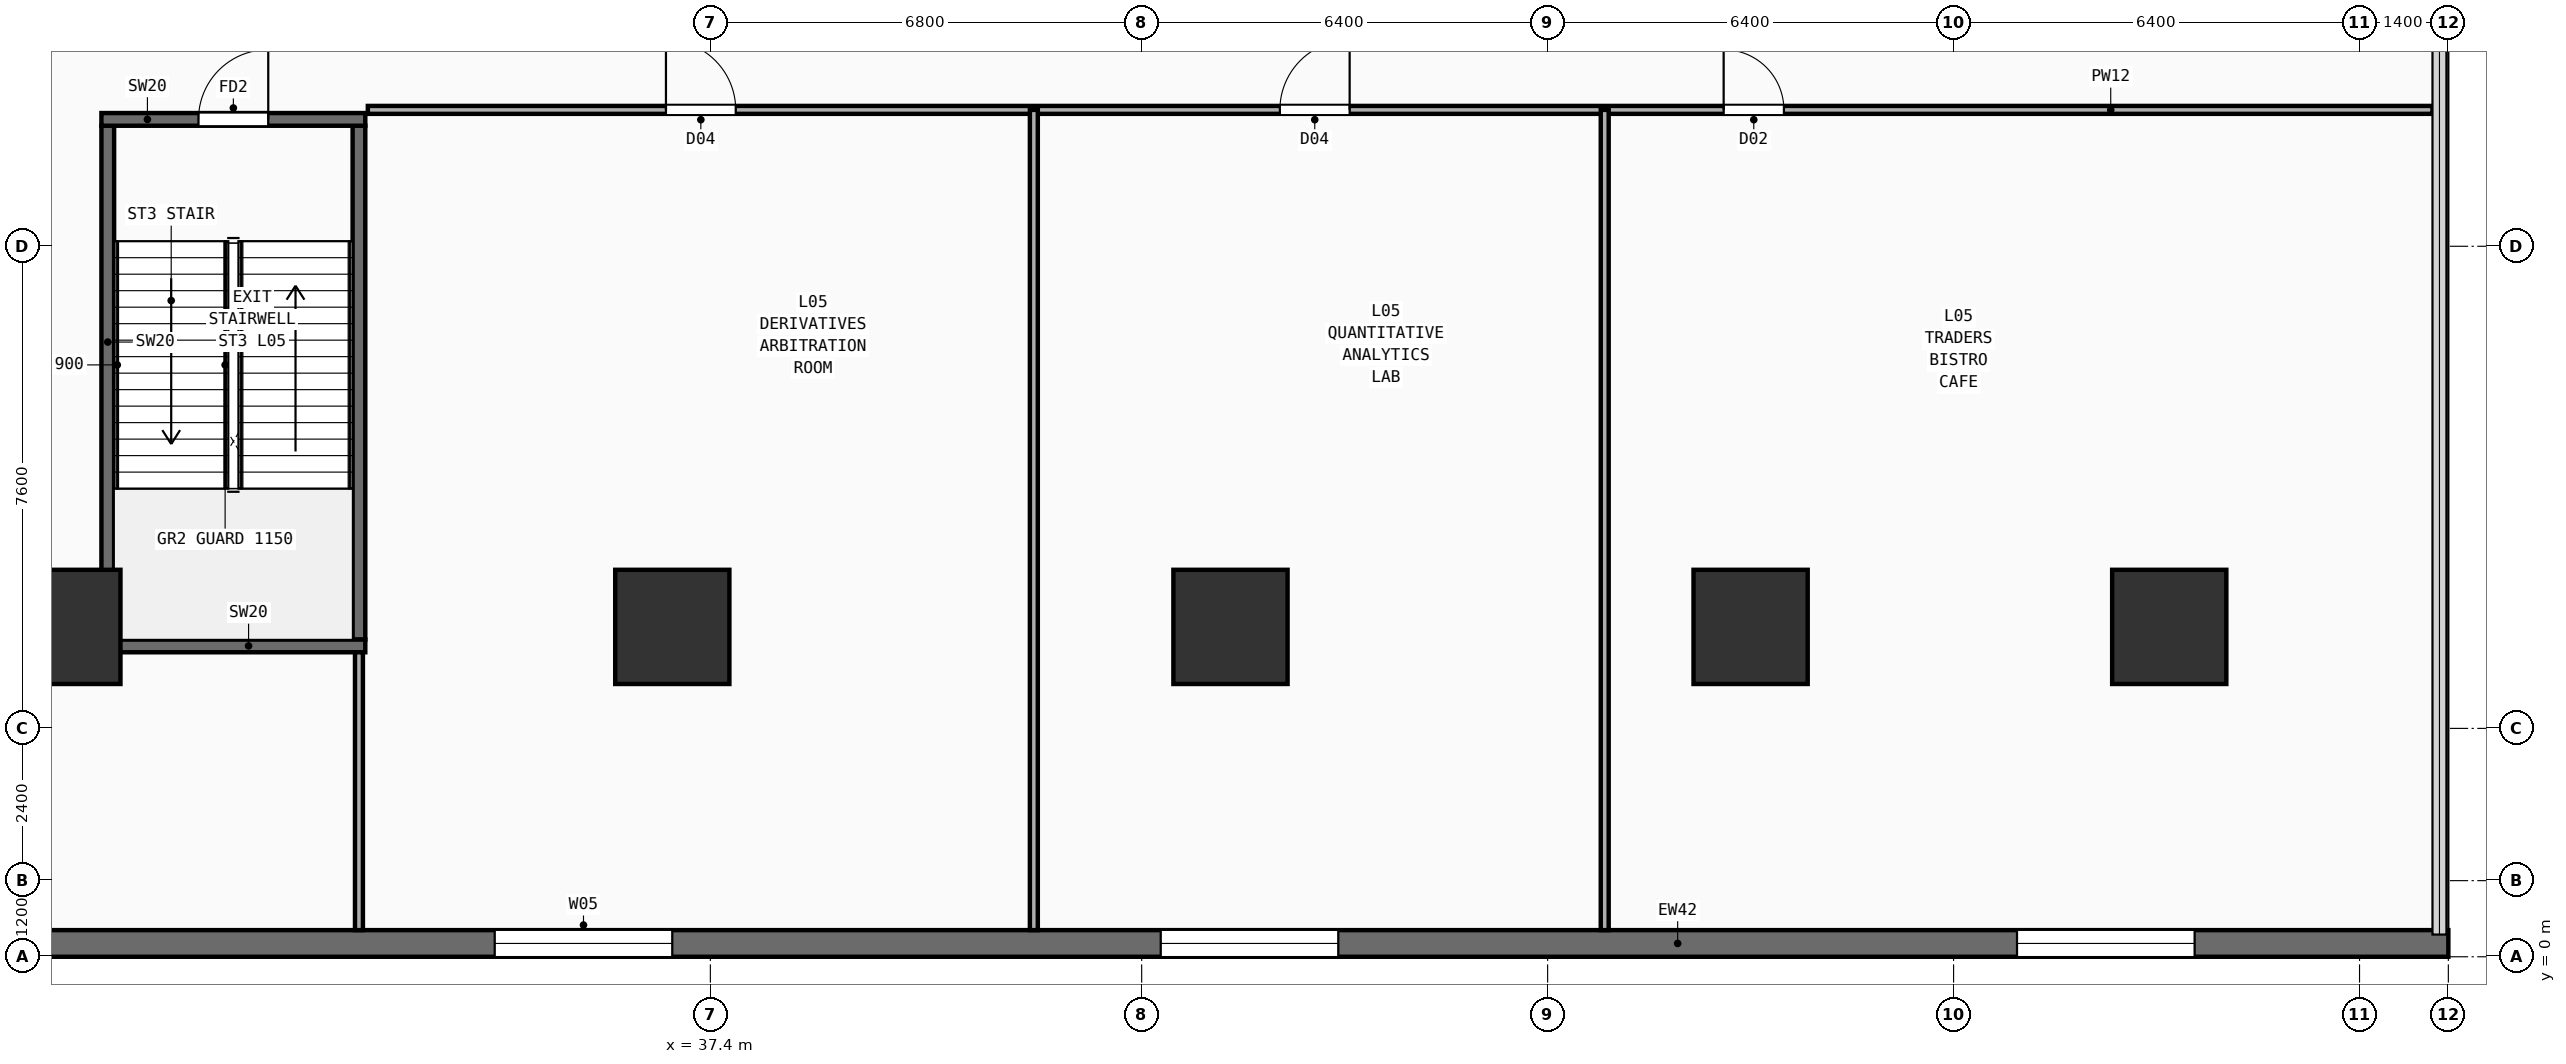
"""IFC4 building model, lengths in metres.
Left out: names, types, materials, properties, quantities, classifications, styles, units other than length and angle.
Written with IfcOpenShell. Run it as: python <this file> out.ifc"""

import sys

from ifc_helpers import new_model, si_unit, direction, frame, frame_2d, origin, origin_2d, place, context, subcontext, project, spatial, rectangle, extrude, element, fill, save


model = new_model("IFC4")
c1 = context("Model", 3, precision=1e-05, world=origin(), true_north=direction((0.0, 1.0)))
c2 = subcontext(c1, "Body", "Model", "MODEL_VIEW")
j1 = project(units=[si_unit("LENGTHUNIT", "METRE"), si_unit("PLANEANGLEUNIT", "RADIAN")], contexts=[c1])
p1 = place(None, origin())
s1 = spatial("IfcSite", under=j1, at=p1, CompositionType="ELEMENT")
p2 = place(p1, origin())
s2 = spatial("IfcBuilding", under=s1, at=p2, CompositionType="ELEMENT")
p3 = place(p2, frame((0.0, 0.0, 20.0)))
s3 = spatial("IfcBuildingStorey", under=s2, at=p3, CompositionType="ELEMENT", Elevation=20.0)
for number, where, z_axis, x_axis in (
    (1, (27.2, 5.2, 0.0), (0.0, 0.0, 1.0), (1.0, 0.0, 0.0)),
    (2, (36.8, 5.2, 0.0), (0.0, 0.0, 1.0), (1.0, 0.0, 0.0)),
    (3, (45.6, 5.2, 0.0), (0.0, 0.0, 1.0), (1.0, 0.0, 0.0)),
    (4, (53.8, 5.2, 0.0), (0.0, 0.0, 1.0), (1.0, 0.0, 0.0)),
    (5, (60.4, 5.2, 0.0), (0.0, 0.0, 1.0), (1.0, 0.0, 0.0)),
):
    element("IfcColumn", number, at=place(p3, frame(where, z_axis=z_axis, x_axis=x_axis)), inside=s3, PredefinedType="COLUMN", context=c2, shape_type="SweptSolid", body=[
        extrude(rectangle(XDim=1.8, YDim=1.8, at=origin_2d()), origin(), (0.0, 0.0, 1.0), 4.46),
    ])
p4 = place(p3, frame((0.0, 0.21, 0.0), z_axis=(0.0, 0.0, 1.0), x_axis=(1.0, 0.0, 0.0)))
e6 = element("IfcWall", 6, at=p4, inside=s3, PredefinedType="SOLIDWALL", context=c2, shape_type="SweptSolid", body=[
    extrude(rectangle(XDim=64.8, YDim=0.42, at=frame_2d((32.4, 0.0))), origin(), (0.0, 0.0, 1.0), 4.46),
])
p5 = place(p4, frame((8.0, 0.0, 0.95)))
e7 = element("IfcOpeningElement", 7, at=p5, cuts=e6, PredefinedType="OPENING", context=c2, shape_type="SweptSolid", body=[
    extrude(rectangle(XDim=2.8, YDim=2.4, at=frame_2d((1.4, 1.2))), frame((0.0, 0.22, 0.0), z_axis=(0.0, -1.0, 0.0), x_axis=(1.0, 0.0, 0.0)), (0.0, 0.0, 1.0), 0.44),
])
p6 = place(p4, frame((16.0, 0.0, 0.95)))
e8 = element("IfcOpeningElement", 8, at=p6, cuts=e6, PredefinedType="OPENING", context=c2, shape_type="SweptSolid", body=[
    extrude(rectangle(XDim=2.8, YDim=2.4, at=frame_2d((1.4, 1.2))), frame((0.0, 0.22, 0.0), z_axis=(0.0, -1.0, 0.0), x_axis=(1.0, 0.0, 0.0)), (0.0, 0.0, 1.0), 0.44),
])
p7 = place(p4, frame((24.0, 0.0, 0.95)))
e9 = element("IfcOpeningElement", 9, at=p7, cuts=e6, PredefinedType="OPENING", context=c2, shape_type="SweptSolid", body=[
    extrude(rectangle(XDim=2.8, YDim=2.4, at=frame_2d((1.4, 1.2))), frame((0.0, 0.22, 0.0), z_axis=(0.0, -1.0, 0.0), x_axis=(1.0, 0.0, 0.0)), (0.0, 0.0, 1.0), 0.44),
])
p8 = place(p4, frame((34.0, 0.0, 0.95)))
e10 = element("IfcOpeningElement", 10, at=p8, cuts=e6, PredefinedType="OPENING", context=c2, shape_type="SweptSolid", body=[
    extrude(rectangle(XDim=2.8, YDim=2.4, at=frame_2d((1.4, 1.2))), frame((0.0, 0.22, 0.0), z_axis=(0.0, -1.0, 0.0), x_axis=(1.0, 0.0, 0.0)), (0.0, 0.0, 1.0), 0.44),
])
p9 = place(p4, frame((44.5, 0.0, 0.95)))
e11 = element("IfcOpeningElement", 11, at=p9, cuts=e6, PredefinedType="OPENING", context=c2, shape_type="SweptSolid", body=[
    extrude(rectangle(XDim=2.8, YDim=2.4, at=frame_2d((1.4, 1.2))), frame((0.0, 0.22, 0.0), z_axis=(0.0, -1.0, 0.0), x_axis=(1.0, 0.0, 0.0)), (0.0, 0.0, 1.0), 0.44),
])
p10 = place(p4, frame((58.0, 0.0, 0.95)))
e12 = element("IfcOpeningElement", 12, at=p10, cuts=e6, PredefinedType="OPENING", context=c2, shape_type="SweptSolid", body=[
    extrude(rectangle(XDim=2.8, YDim=2.4, at=frame_2d((1.4, 1.2))), frame((0.0, 0.22, 0.0), z_axis=(0.0, -1.0, 0.0), x_axis=(1.0, 0.0, 0.0)), (0.0, 0.0, 1.0), 0.44),
])
for number, where, z_axis, x_axis in (
    (13, (27.9, 5.0, 0.0), (0.0, 0.0, 1.0), (0.0, 1.0, 0.0)),
    (14, (31.86, 5.0, 0.0), (0.0, 0.0, 1.0), (0.0, 1.0, 0.0)),
):
    element("IfcWall", number, at=place(p3, frame(where, z_axis=z_axis, x_axis=x_axis)), inside=s3, PredefinedType="SHEAR", context=c2, shape_type="SweptSolid", body=[
        extrude(rectangle(XDim=8.1, YDim=0.2, at=frame_2d((4.05, 0.0))), origin(), (0.0, 0.0, 1.0), 4.46),
    ])
p11 = place(p3, frame((27.8, 4.9, 0.0), z_axis=(0.0, 0.0, 1.0), x_axis=(1.0, 0.0, 0.0)))
e15 = element("IfcWall", 15, at=p11, inside=s3, PredefinedType="SHEAR", context=c2, shape_type="SweptSolid", body=[
    extrude(rectangle(XDim=4.16, YDim=0.2, at=frame_2d((2.08, 0.0))), origin(), (0.0, 0.0, 1.0), 4.46),
])
p12 = place(p3, frame((27.8, 13.2, 0.0), z_axis=(0.0, 0.0, 1.0), x_axis=(1.0, 0.0, 0.0)))
e16 = element("IfcWall", 16, at=p12, inside=s3, PredefinedType="SHEAR", context=c2, shape_type="SweptSolid", body=[
    extrude(rectangle(XDim=4.16, YDim=0.2, at=frame_2d((2.08, 0.0))), origin(), (0.0, 0.0, 1.0), 4.46),
])
p13 = place(p12, frame((1.53, 0.0, 0.0)))
e17 = element("IfcOpeningElement", 17, at=p13, cuts=e16, PredefinedType="OPENING", context=c2, shape_type="SweptSolid", body=[
    extrude(rectangle(XDim=1.1, YDim=2.2, at=frame_2d((0.55, 1.1))), frame((0.0, 0.11, 0.0), z_axis=(0.0, -1.0, 0.0), x_axis=(1.0, 0.0, 0.0)), (0.0, 0.0, 1.0), 0.22),
])
p14 = place(p3, frame((32.0, 13.35, 0.0), z_axis=(0.0, 0.0, 1.0), x_axis=(1.0, 0.0, 0.0)))
e18 = element("IfcWall", 18, at=p14, inside=s3, PredefinedType="PARTITIONING", context=c2, shape_type="SweptSolid", body=[
    extrude(rectangle(XDim=32.55, YDim=0.125, at=frame_2d((16.275, 0.0))), origin(), (0.0, 0.0, 1.0), 3.96),
])
p15 = place(p14, frame((4.7, 0.0, 0.0)))
e19 = element("IfcOpeningElement", 19, at=p15, cuts=e18, PredefinedType="OPENING", context=c2, shape_type="SweptSolid", body=[
    extrude(rectangle(XDim=1.1, YDim=2.2, at=frame_2d((0.55, 1.1))), frame((0.0, 0.073, 0.0), z_axis=(0.0, -1.0, 0.0), x_axis=(1.0, 0.0, 0.0)), (0.0, 0.0, 1.0), 0.145),
])
p16 = place(p14, frame((14.379, 0.0, 0.0)))
e20 = element("IfcOpeningElement", 20, at=p16, cuts=e18, PredefinedType="OPENING", context=c2, shape_type="SweptSolid", body=[
    extrude(rectangle(XDim=1.1, YDim=2.2, at=frame_2d((0.55, 1.1))), frame((0.0, 0.073, 0.0), z_axis=(0.0, -1.0, 0.0), x_axis=(1.0, 0.0, 0.0)), (0.0, 0.0, 1.0), 0.145),
])
p17 = place(p14, frame((21.375, 0.0, 0.0)))
e21 = element("IfcOpeningElement", 21, at=p17, cuts=e18, PredefinedType="OPENING", context=c2, shape_type="SweptSolid", body=[
    extrude(rectangle(XDim=0.95, YDim=2.15, at=frame_2d((0.475, 1.075))), frame((0.0, 0.073, 0.0), z_axis=(0.0, -1.0, 0.0), x_axis=(1.0, 0.0, 0.0)), (0.0, 0.0, 1.0), 0.145),
])
p18 = place(p3, frame((31.86, 0.42, 0.0), z_axis=(0.0, 0.0, 1.0), x_axis=(0.0, 1.0, 0.0)))
e22 = element("IfcWall", 22, at=p18, inside=s3, PredefinedType="PARTITIONING", context=c2, shape_type="SweptSolid", body=[
    extrude(rectangle(XDim=4.38, YDim=0.125, at=frame_2d((2.19, 0.0))), origin(), (0.0, 0.0, 1.0), 4.46),
])
for number, where, z_axis, x_axis in (
    (23, (42.5, 0.42, 0.0), (0.0, 0.0, 1.0), (0.0, 1.0, 0.0)),
    (24, (51.5, 0.42, 0.0), (0.0, 0.0, 1.0), (0.0, 1.0, 0.0)),
):
    element("IfcWall", number, at=place(p3, frame(where, z_axis=z_axis, x_axis=x_axis)), inside=s3, PredefinedType="PARTITIONING", context=c2, shape_type="SweptSolid", body=[
        extrude(rectangle(XDim=12.93, YDim=0.125, at=frame_2d((6.465, 0.0))), origin(), (0.0, 0.0, 1.0), 4.46),
    ])
p19 = place(p8, origin())
e25 = element("IfcWindow", 25, at=p19, inside=s3, PartitioningType="SINGLE_PANEL", PredefinedType="WINDOW", context=c2, shape_type="SweptSolid", body=[
    extrude(rectangle(XDim=2.8, YDim=2.4, at=frame_2d((1.4, 1.2))), frame((0.0, 0.03, 0.0), z_axis=(0.0, -1.0, 0.0), x_axis=(1.0, 0.0, 0.0)), (0.0, 0.0, 1.0), 0.06),
])
fill(e10, e25)
p20 = place(p9, origin())
e26 = element("IfcWindow", 26, at=p20, inside=s3, PartitioningType="SINGLE_PANEL", PredefinedType="WINDOW", context=c2, shape_type="SweptSolid", body=[
    extrude(rectangle(XDim=2.8, YDim=2.4, at=frame_2d((1.4, 1.2))), frame((0.0, 0.03, 0.0), z_axis=(0.0, -1.0, 0.0), x_axis=(1.0, 0.0, 0.0)), (0.0, 0.0, 1.0), 0.06),
])
fill(e11, e26)
p21 = place(p10, origin())
e27 = element("IfcWindow", 27, at=p21, inside=s3, PartitioningType="SINGLE_PANEL", PredefinedType="WINDOW", context=c2, shape_type="SweptSolid", body=[
    extrude(rectangle(XDim=2.8, YDim=2.4, at=frame_2d((1.4, 1.2))), frame((0.0, 0.03, 0.0), z_axis=(0.0, -1.0, 0.0), x_axis=(1.0, 0.0, 0.0)), (0.0, 0.0, 1.0), 0.06),
])
fill(e12, e27)
p22 = place(p13, frame((1.1, 0.0, 0.0), z_axis=(0.0, 0.0, 1.0), x_axis=(-1.0, 0.0, 0.0)))
e28 = element("IfcDoor", 28, at=p22, inside=s3, OperationType="SINGLE_SWING_LEFT", PredefinedType="DOOR", context=c2, shape_type="SweptSolid", body=[
    extrude(rectangle(XDim=1.1, YDim=2.2, at=frame_2d((0.55, 1.1))), frame((0.0, 0.025, 0.0), z_axis=(0.0, -1.0, 0.0), x_axis=(1.0, 0.0, 0.0)), (0.0, 0.0, 1.0), 0.05),
])
fill(e17, e28)
p23 = place(p15, origin())
e29 = element("IfcDoor", 29, at=p23, inside=s3, OperationType="SINGLE_SWING_LEFT", PredefinedType="DOOR", context=c2, shape_type="SweptSolid", body=[
    extrude(rectangle(XDim=1.1, YDim=2.2, at=frame_2d((0.55, 1.1))), frame((0.0, 0.025, 0.0), z_axis=(0.0, -1.0, 0.0), x_axis=(1.0, 0.0, 0.0)), (0.0, 0.0, 1.0), 0.05),
])
fill(e19, e29)
p24 = place(p16, origin())
e30 = element("IfcDoor", 30, at=p24, inside=s3, OperationType="SINGLE_SWING_RIGHT", PredefinedType="DOOR", context=c2, shape_type="SweptSolid", body=[
    extrude(rectangle(XDim=1.1, YDim=2.2, at=frame_2d((0.55, 1.1))), frame((0.0, 0.025, 0.0), z_axis=(0.0, -1.0, 0.0), x_axis=(1.0, 0.0, 0.0)), (0.0, 0.0, 1.0), 0.05),
])
fill(e20, e30)
p25 = place(p17, origin())
e31 = element("IfcDoor", 31, at=p25, inside=s3, OperationType="SINGLE_SWING_LEFT", PredefinedType="DOOR", context=c2, shape_type="SweptSolid", body=[
    extrude(rectangle(XDim=0.95, YDim=2.15, at=frame_2d((0.475, 1.075))), frame((0.0, 0.025, 0.0), z_axis=(0.0, -1.0, 0.0), x_axis=(1.0, 0.0, 0.0)), (0.0, 0.0, 1.0), 0.05),
])
fill(e21, e31)
save(model, sys.argv[1])
